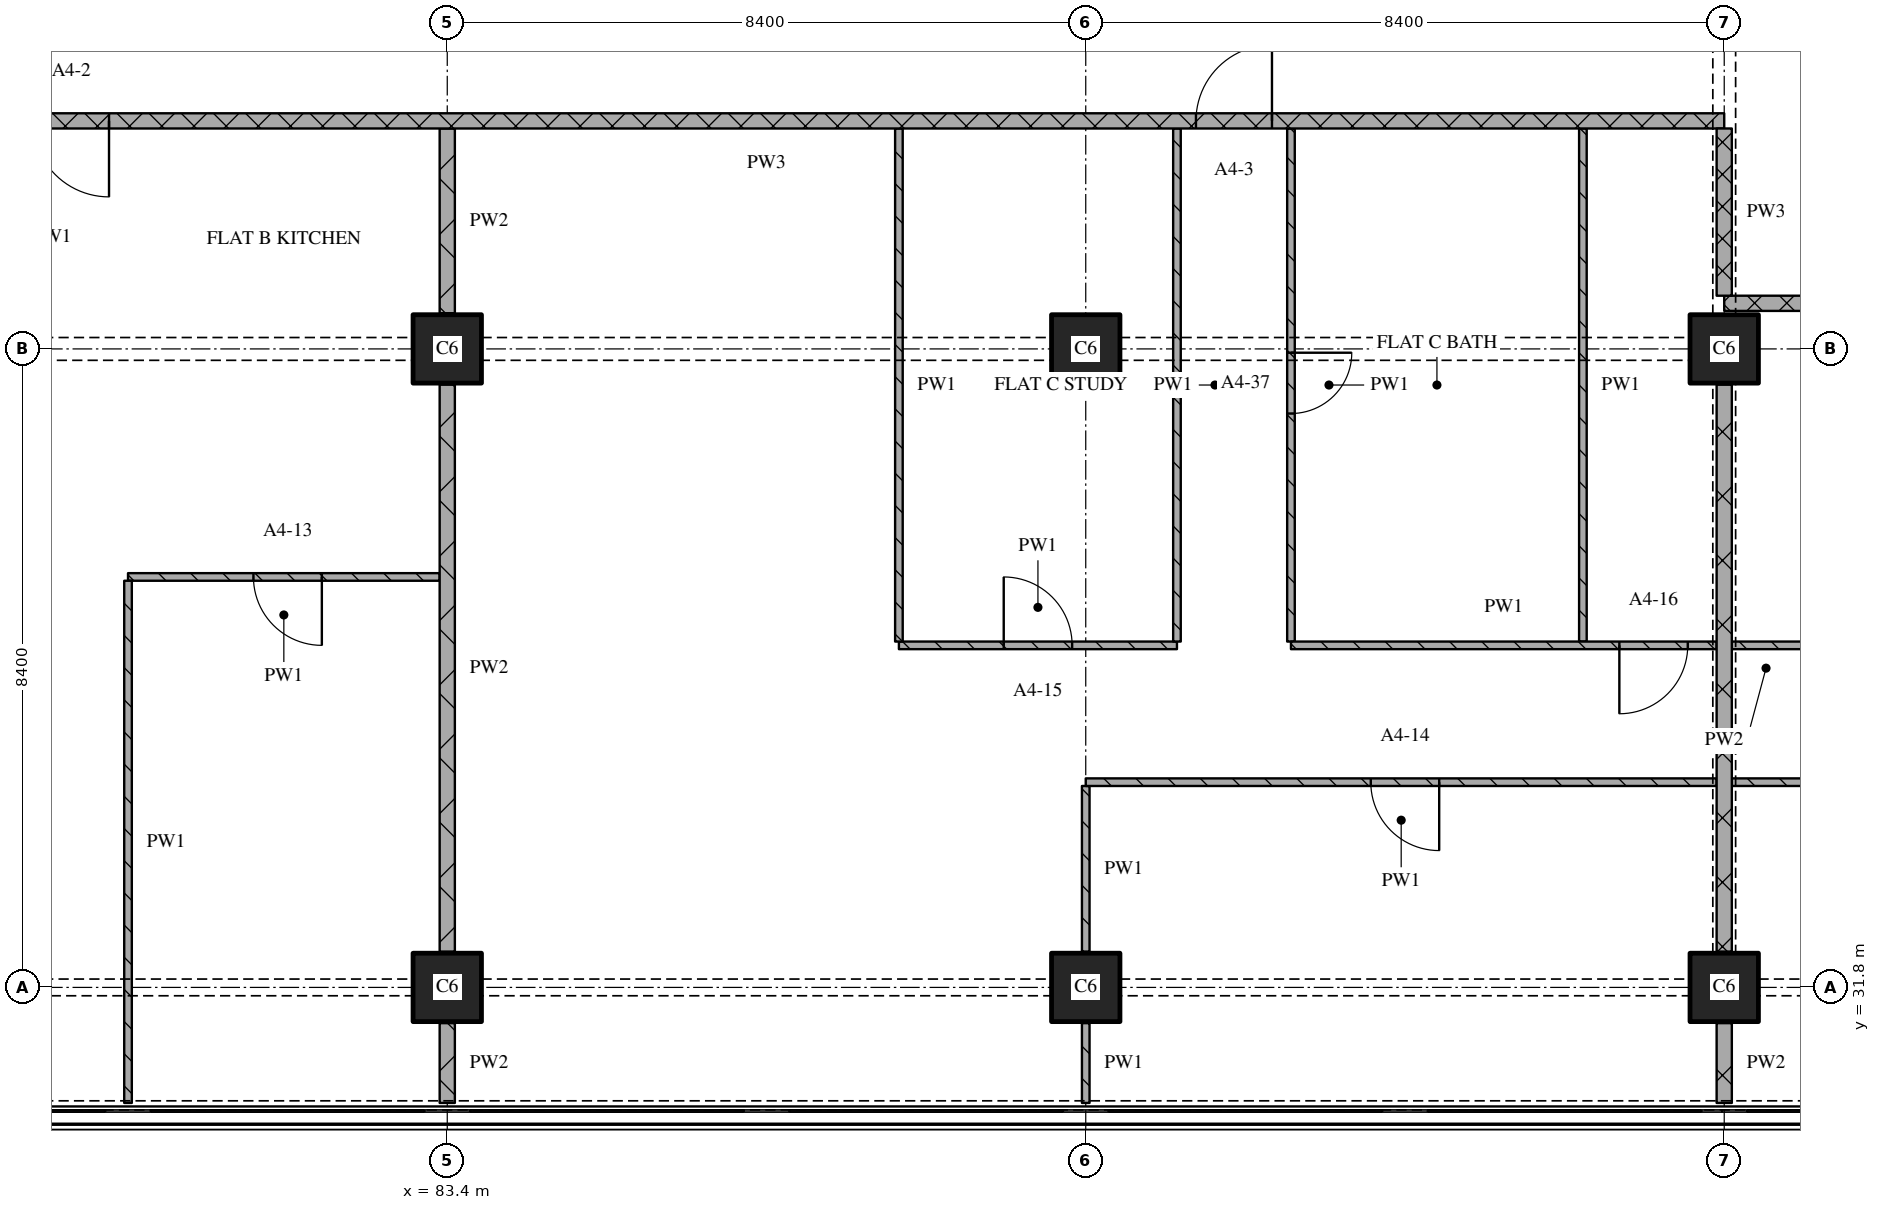
"""IFC4 building model, lengths in metres.
Left out: names, types, materials, properties, quantities, classifications, styles, units other than length and angle.
Written with IfcOpenShell. Run it as: python <this file> out.ifc"""

import sys

from ifc_helpers import new_model, si_unit, direction, frame, frame_2d, origin, origin_2d, place, context, subcontext, project, spatial, rectangle, extrude, element, fill, save


model = new_model("IFC4")
c1 = context("Model", 3, precision=1e-05, world=origin(), true_north=direction((0.0, 1.0)))
c2 = subcontext(c1, "Body", "Model", "MODEL_VIEW")
j1 = project(units=[si_unit("LENGTHUNIT", "METRE"), si_unit("PLANEANGLEUNIT", "RADIAN")], contexts=[c1])
p1 = place(None, origin())
s1 = spatial("IfcSite", under=j1, at=p1, CompositionType="ELEMENT")
p2 = place(p1, origin())
s2 = spatial("IfcBuilding", under=s1, at=p2, CompositionType="ELEMENT")
p3 = place(p2, frame((0.0, 0.0, 76.8)))
s3 = spatial("IfcBuildingStorey", under=s2, at=p3, CompositionType="ELEMENT", Elevation=76.8)
for number, where, z_axis, x_axis in (
    (1, (83.4, 31.8, 0.0), (0.0, 0.0, 1.0), (1.0, 0.0, 0.0)),
    (2, (83.4, 40.2, 0.0), (0.0, 0.0, 1.0), (1.0, 0.0, 0.0)),
    (3, (91.8, 31.8, 0.0), (0.0, 0.0, 1.0), (1.0, 0.0, 0.0)),
    (4, (91.8, 40.2, 0.0), (0.0, 0.0, 1.0), (1.0, 0.0, 0.0)),
    (5, (100.2, 31.8, 0.0), (0.0, 0.0, 1.0), (1.0, 0.0, 0.0)),
    (6, (100.2, 40.2, 0.0), (0.0, 0.0, 1.0), (1.0, 0.0, 0.0)),
):
    element("IfcColumn", number, at=place(p3, frame(where, z_axis=z_axis, x_axis=x_axis)), inside=s3, PredefinedType="COLUMN", context=c2, shape_type="SweptSolid", body=[
        extrude(rectangle(XDim=0.9, YDim=0.9, at=origin_2d()), origin(), (0.0, 0.0, 1.0), 3.6),
    ])
p4 = place(p3, frame((89.342, 36.3, 0.0), z_axis=(0.0, 0.0, 1.0), x_axis=(1.0, 0.0, 0.0)))
e7 = element("IfcWall", 7, at=p4, inside=s3, PredefinedType="PARTITIONING", context=c2, shape_type="SweptSolid", body=[
    extrude(rectangle(XDim=3.658, YDim=0.1, at=frame_2d((1.829, 0.0))), origin(), (0.0, 0.0, 1.0), 3.32),
])
p5 = place(p4, frame((1.379, 0.0, 0.0)))
e8 = element("IfcOpeningElement", 8, at=p5, cuts=e7, PredefinedType="OPENING", context=c2, shape_type="SweptSolid", body=[
    extrude(rectangle(XDim=0.9, YDim=2.1, at=frame_2d((0.45, 1.05))), frame((0.0, 0.06, 0.0), z_axis=(0.0, -1.0, 0.0), x_axis=(1.0, 0.0, 0.0)), (0.0, 0.0, 1.0), 0.12),
])
p6 = place(p3, frame((83.3, 37.2, 0.0), z_axis=(0.0, 0.0, 1.0), x_axis=(-1.0, 0.0, 0.0)))
e9 = element("IfcWall", 9, at=p6, inside=s3, PredefinedType="PARTITIONING", context=c2, shape_type="SweptSolid", body=[
    extrude(rectangle(XDim=4.1, YDim=0.1, at=frame_2d((2.05, 0.0))), origin(), (0.0, 0.0, 1.0), 3.32),
])
p7 = place(p6, frame((1.55, 0.0, 0.0)))
e10 = element("IfcOpeningElement", 10, at=p7, cuts=e9, PredefinedType="OPENING", context=c2, shape_type="SweptSolid", body=[
    extrude(rectangle(XDim=0.9, YDim=2.1, at=frame_2d((0.45, 1.05))), frame((0.0, 0.06, 0.0), z_axis=(0.0, -1.0, 0.0), x_axis=(1.0, 0.0, 0.0)), (0.0, 0.0, 1.0), 0.12),
])
p8 = place(p3, frame((124.28, 40.8, 0.0), z_axis=(0.0, 0.0, 1.0), x_axis=(-1.0, 0.0, 0.0)))
e11 = element("IfcWall", 11, at=p8, inside=s3, PredefinedType="PARTITIONING", context=c2, shape_type="SweptSolid", body=[
    extrude(rectangle(XDim=24.08, YDim=0.2, at=frame_2d((12.04, 0.0))), origin(), (0.0, 0.0, 1.0), 3.32),
])
p9 = place(p8, frame((12.03, 0.0, 0.0)))
e12 = element("IfcOpeningElement", 12, at=p9, cuts=e11, PredefinedType="OPENING", context=c2, shape_type="SweptSolid", body=[
    extrude(rectangle(XDim=1.0, YDim=2.1, at=frame_2d((0.5, 1.05))), frame((0.0, 0.11, 0.0), z_axis=(0.0, -1.0, 0.0), x_axis=(1.0, 0.0, 0.0)), (0.0, 0.0, 1.0), 0.22),
])
p10 = place(p3, frame((100.2, 43.2, 0.0), z_axis=(0.0, 0.0, 1.0), x_axis=(-1.0, 0.0, 0.0)))
e13 = element("IfcWall", 13, at=p10, inside=s3, PredefinedType="PARTITIONING", context=c2, shape_type="SweptSolid", body=[
    extrude(rectangle(XDim=25.2, YDim=0.2, at=frame_2d((12.6, 0.0))), origin(), (0.0, 0.0, 1.0), 3.32),
])
p11 = place(p10, frame((5.95, 0.0, 0.0)))
e14 = element("IfcOpeningElement", 14, at=p11, cuts=e13, PredefinedType="OPENING", context=c2, shape_type="SweptSolid", body=[
    extrude(rectangle(XDim=1.0, YDim=2.1, at=frame_2d((0.5, 1.05))), frame((0.0, 0.11, 0.0), z_axis=(0.0, -1.0, 0.0), x_axis=(1.0, 0.0, 0.0)), (0.0, 0.0, 1.0), 0.22),
])
p12 = place(p10, frame((21.25, 0.0, 0.0)))
e15 = element("IfcOpeningElement", 15, at=p12, cuts=e13, PredefinedType="OPENING", context=c2, shape_type="SweptSolid", body=[
    extrude(rectangle(XDim=1.0, YDim=2.1, at=frame_2d((0.5, 1.05))), frame((0.0, 0.11, 0.0), z_axis=(0.0, -1.0, 0.0), x_axis=(1.0, 0.0, 0.0)), (0.0, 0.0, 1.0), 0.22),
])
p13 = place(p3, frame((79.2, 37.15, 0.0), z_axis=(0.0, 0.0, 1.0), x_axis=(0.0, -1.0, 0.0)))
e16 = element("IfcWall", 16, at=p13, inside=s3, PredefinedType="PARTITIONING", context=c2, shape_type="SweptSolid", body=[
    extrude(rectangle(XDim=6.87, YDim=0.1, at=frame_2d((3.435, 0.0))), origin(), (0.0, 0.0, 1.0), 3.32),
])
p14 = place(p3, frame((83.4, 31.33, 0.0), z_axis=(0.0, 0.0, 1.0), x_axis=(0.0, -1.0, 0.0)))
e17 = element("IfcWall", 17, at=p14, inside=s3, PredefinedType="PARTITIONING", context=c2, shape_type="SweptSolid", body=[
    extrude(rectangle(XDim=1.05, YDim=0.2, at=frame_2d((0.525, 0.0))), origin(), (0.0, 0.0, 1.0), 3.32),
])
p15 = place(p3, frame((83.4, 39.73, 0.0), z_axis=(0.0, 0.0, 1.0), x_axis=(0.0, -1.0, 0.0)))
e18 = element("IfcWall", 18, at=p15, inside=s3, PredefinedType="PARTITIONING", context=c2, shape_type="SweptSolid", body=[
    extrude(rectangle(XDim=7.46, YDim=0.2, at=frame_2d((3.73, 0.0))), origin(), (0.0, 0.0, 1.0), 3.32),
])
p16 = place(p3, frame((83.4, 43.1, 0.0), z_axis=(0.0, 0.0, 1.0), x_axis=(0.0, -1.0, 0.0)))
e19 = element("IfcWall", 19, at=p16, inside=s3, PredefinedType="PARTITIONING", context=c2, shape_type="SweptSolid", body=[
    extrude(rectangle(XDim=2.43, YDim=0.2, at=frame_2d((1.215, 0.0))), origin(), (0.0, 0.0, 1.0), 3.32),
])
p17 = place(p3, frame((89.342, 43.1, 0.0), z_axis=(0.0, 0.0, 1.0), x_axis=(0.0, -1.0, 0.0)))
e20 = element("IfcWall", 20, at=p17, inside=s3, PredefinedType="PARTITIONING", context=c2, shape_type="SweptSolid", body=[
    extrude(rectangle(XDim=6.75, YDim=0.1, at=frame_2d((3.375, 0.0))), origin(), (0.0, 0.0, 1.0), 3.32),
])
p18 = place(p3, frame((91.8, 31.33, 0.0), z_axis=(0.0, 0.0, 1.0), x_axis=(0.0, -1.0, 0.0)))
e21 = element("IfcWall", 21, at=p18, inside=s3, PredefinedType="PARTITIONING", context=c2, shape_type="SweptSolid", body=[
    extrude(rectangle(XDim=1.05, YDim=0.1, at=frame_2d((0.525, 0.0))), origin(), (0.0, 0.0, 1.0), 3.32),
])
p19 = place(p3, frame((91.8, 34.45, 0.0), z_axis=(0.0, 0.0, 1.0), x_axis=(0.0, -1.0, 0.0)))
e22 = element("IfcWall", 22, at=p19, inside=s3, PredefinedType="PARTITIONING", context=c2, shape_type="SweptSolid", body=[
    extrude(rectangle(XDim=2.18, YDim=0.1, at=frame_2d((1.09, 0.0))), origin(), (0.0, 0.0, 1.0), 3.32),
])
p20 = place(p3, frame((93.0, 43.1, 0.0), z_axis=(0.0, 0.0, 1.0), x_axis=(0.0, -1.0, 0.0)))
e23 = element("IfcWall", 23, at=p20, inside=s3, PredefinedType="PARTITIONING", context=c2, shape_type="SweptSolid", body=[
    extrude(rectangle(XDim=6.75, YDim=0.1, at=frame_2d((3.375, 0.0))), origin(), (0.0, 0.0, 1.0), 3.32),
])
p21 = place(p3, frame((94.5, 43.1, 0.0), z_axis=(0.0, 0.0, 1.0), x_axis=(0.0, -1.0, 0.0)))
e24 = element("IfcWall", 24, at=p21, inside=s3, PredefinedType="PARTITIONING", context=c2, shape_type="SweptSolid", body=[
    extrude(rectangle(XDim=6.75, YDim=0.1, at=frame_2d((3.375, 0.0))), origin(), (0.0, 0.0, 1.0), 3.32),
])
p22 = place(p21, frame((2.95, 0.0, 0.0)))
e25 = element("IfcOpeningElement", 25, at=p22, cuts=e24, PredefinedType="OPENING", context=c2, shape_type="SweptSolid", body=[
    extrude(rectangle(XDim=0.8, YDim=2.1, at=frame_2d((0.4, 1.05))), frame((0.0, 0.06, 0.0), z_axis=(0.0, -1.0, 0.0), x_axis=(1.0, 0.0, 0.0)), (0.0, 0.0, 1.0), 0.12),
])
p23 = place(p3, frame((98.341, 43.1, 0.0), z_axis=(0.0, 0.0, 1.0), x_axis=(0.0, -1.0, 0.0)))
e26 = element("IfcWall", 26, at=p23, inside=s3, PredefinedType="PARTITIONING", context=c2, shape_type="SweptSolid", body=[
    extrude(rectangle(XDim=6.75, YDim=0.1, at=frame_2d((3.375, 0.0))), origin(), (0.0, 0.0, 1.0), 3.32),
])
p24 = place(p3, frame((100.2, 43.1, 0.0), z_axis=(0.0, 0.0, 1.0), x_axis=(0.0, -1.0, 0.0)))
e27 = element("IfcWall", 27, at=p24, inside=s3, PredefinedType="PARTITIONING", context=c2, shape_type="SweptSolid", body=[
    extrude(rectangle(XDim=2.2, YDim=0.2, at=frame_2d((1.1, 0.0))), origin(), (0.0, 0.0, 1.0), 2.43),
])
p25 = place(p3, frame((100.2, 31.33, 0.0), z_axis=(0.0, 0.0, 1.0), x_axis=(0.0, -1.0, 0.0)))
e28 = element("IfcWall", 28, at=p25, inside=s3, PredefinedType="PARTITIONING", context=c2, shape_type="SweptSolid", body=[
    extrude(rectangle(XDim=1.05, YDim=0.2, at=frame_2d((0.525, 0.0))), origin(), (0.0, 0.0, 1.0), 3.32),
])
p26 = place(p3, frame((100.2, 39.73, 0.0), z_axis=(0.0, 0.0, 1.0), x_axis=(0.0, -1.0, 0.0)))
e29 = element("IfcWall", 29, at=p26, inside=s3, PredefinedType="PARTITIONING", context=c2, shape_type="SweptSolid", body=[
    extrude(rectangle(XDim=7.46, YDim=0.2, at=frame_2d((3.73, 0.0))), origin(), (0.0, 0.0, 1.0), 2.83),
])
p27 = place(p3, frame((100.1, 34.5, 0.0), z_axis=(0.0, 0.0, 1.0), x_axis=(-1.0, 0.0, 0.0)))
e30 = element("IfcWall", 30, at=p27, inside=s3, PredefinedType="PARTITIONING", context=c2, shape_type="SweptSolid", body=[
    extrude(rectangle(XDim=8.3, YDim=0.1, at=frame_2d((4.15, 0.0))), origin(), (0.0, 0.0, 1.0), 3.32),
])
p28 = place(p27, frame((3.65, 0.0, 0.0)))
e31 = element("IfcOpeningElement", 31, at=p28, cuts=e30, PredefinedType="OPENING", context=c2, shape_type="SweptSolid", body=[
    extrude(rectangle(XDim=0.9, YDim=2.1, at=frame_2d((0.45, 1.05))), frame((0.0, 0.06, 0.0), z_axis=(0.0, -1.0, 0.0), x_axis=(1.0, 0.0, 0.0)), (0.0, 0.0, 1.0), 0.12),
])
p29 = place(p3, frame((117.0, 34.5, 0.0), z_axis=(0.0, 0.0, 1.0), x_axis=(-1.0, 0.0, 0.0)))
e32 = element("IfcWall", 32, at=p29, inside=s3, PredefinedType="PARTITIONING", context=c2, shape_type="SweptSolid", body=[
    extrude(rectangle(XDim=16.7, YDim=0.1, at=frame_2d((8.35, 0.0))), origin(), (0.0, 0.0, 1.0), 3.32),
])
p30 = place(p29, frame((7.95, 0.0, 0.0)))
e33 = element("IfcOpeningElement", 33, at=p30, cuts=e32, PredefinedType="OPENING", context=c2, shape_type="SweptSolid", body=[
    extrude(rectangle(XDim=0.9, YDim=2.1, at=frame_2d((0.45, 1.05))), frame((0.0, 0.06, 0.0), z_axis=(0.0, -1.0, 0.0), x_axis=(1.0, 0.0, 0.0)), (0.0, 0.0, 1.0), 0.12),
])
p31 = place(p29, frame((14.25, 0.0, 0.0)))
e34 = element("IfcOpeningElement", 34, at=p31, cuts=e32, PredefinedType="OPENING", context=c2, shape_type="SweptSolid", body=[
    extrude(rectangle(XDim=0.9, YDim=2.1, at=frame_2d((0.45, 1.05))), frame((0.0, 0.06, 0.0), z_axis=(0.0, -1.0, 0.0), x_axis=(1.0, 0.0, 0.0)), (0.0, 0.0, 1.0), 0.12),
])
p32 = place(p3, frame((94.5, 36.3, 0.0), z_axis=(0.0, 0.0, 1.0), x_axis=(1.0, 0.0, 0.0)))
e35 = element("IfcWall", 35, at=p32, inside=s3, PredefinedType="PARTITIONING", context=c2, shape_type="SweptSolid", body=[
    extrude(rectangle(XDim=5.6, YDim=0.1, at=frame_2d((2.8, 0.0))), origin(), (0.0, 0.0, 1.0), 3.32),
])
p33 = place(p32, frame((4.32, 0.0, 0.0)))
e36 = element("IfcOpeningElement", 36, at=p33, cuts=e35, PredefinedType="OPENING", context=c2, shape_type="SweptSolid", body=[
    extrude(rectangle(XDim=0.9, YDim=2.1, at=frame_2d((0.45, 1.05))), frame((0.0, 0.06, 0.0), z_axis=(0.0, -1.0, 0.0), x_axis=(1.0, 0.0, 0.0)), (0.0, 0.0, 1.0), 0.12),
])
p34 = place(p3, frame((100.3, 36.3, 0.0), z_axis=(0.0, 0.0, 1.0), x_axis=(1.0, 0.0, 0.0)))
e37 = element("IfcWall", 37, at=p34, inside=s3, PredefinedType="PARTITIONING", context=c2, shape_type="SweptSolid", body=[
    extrude(rectangle(XDim=10.7, YDim=0.1, at=frame_2d((5.35, 0.0))), origin(), (0.0, 0.0, 1.0), 3.32),
])
p35 = place(p34, frame((1.75, 0.0, 0.0)))
e38 = element("IfcOpeningElement", 38, at=p35, cuts=e37, PredefinedType="OPENING", context=c2, shape_type="SweptSolid", body=[
    extrude(rectangle(XDim=0.8, YDim=2.1, at=frame_2d((0.4, 1.05))), frame((0.0, 0.06, 0.0), z_axis=(0.0, -1.0, 0.0), x_axis=(1.0, 0.0, 0.0)), (0.0, 0.0, 1.0), 0.12),
])
p36 = place(p34, frame((6.25, 0.0, 0.0)))
e39 = element("IfcOpeningElement", 39, at=p36, cuts=e37, PredefinedType="OPENING", context=c2, shape_type="SweptSolid", body=[
    extrude(rectangle(XDim=0.8, YDim=2.1, at=frame_2d((0.4, 1.05))), frame((0.0, 0.06, 0.0), z_axis=(0.0, -1.0, 0.0), x_axis=(1.0, 0.0, 0.0)), (0.0, 0.0, 1.0), 0.12),
])
p37 = place(p5, origin())
e40 = element("IfcDoor", 40, at=p37, inside=s3, OperationType="SINGLE_SWING_LEFT", PredefinedType="DOOR", context=c2, shape_type="SweptSolid", body=[
    extrude(rectangle(XDim=0.9, YDim=2.1, at=frame_2d((0.45, 1.05))), frame((0.0, 0.025, 0.0), z_axis=(0.0, -1.0, 0.0), x_axis=(1.0, 0.0, 0.0)), (0.0, 0.0, 1.0), 0.05),
])
fill(e8, e40)
p38 = place(p7, origin())
e41 = element("IfcDoor", 41, at=p38, inside=s3, OperationType="SINGLE_SWING_LEFT", PredefinedType="DOOR", context=c2, shape_type="SweptSolid", body=[
    extrude(rectangle(XDim=0.9, YDim=2.1, at=frame_2d((0.45, 1.05))), frame((0.0, 0.025, 0.0), z_axis=(0.0, -1.0, 0.0), x_axis=(1.0, 0.0, 0.0)), (0.0, 0.0, 1.0), 0.05),
])
fill(e10, e41)
p39 = place(p11, origin())
e42 = element("IfcDoor", 42, at=p39, inside=s3, OperationType="SINGLE_SWING_RIGHT", PredefinedType="DOOR", context=c2, shape_type="SweptSolid", body=[
    extrude(rectangle(XDim=1.0, YDim=2.1, at=frame_2d((0.5, 1.05))), frame((0.0, 0.025, 0.0), z_axis=(0.0, -1.0, 0.0), x_axis=(1.0, 0.0, 0.0)), (0.0, 0.0, 1.0), 0.05),
])
fill(e14, e42)
p40 = place(p12, origin())
e43 = element("IfcDoor", 43, at=p40, inside=s3, OperationType="SINGLE_SWING_LEFT", PredefinedType="DOOR", context=c2, shape_type="SweptSolid", body=[
    extrude(rectangle(XDim=1.0, YDim=2.1, at=frame_2d((0.5, 1.05))), frame((0.0, 0.025, 0.0), z_axis=(0.0, -1.0, 0.0), x_axis=(1.0, 0.0, 0.0)), (0.0, 0.0, 1.0), 0.05),
])
fill(e15, e43)
p41 = place(p22, origin())
e44 = element("IfcDoor", 44, at=p41, inside=s3, OperationType="SINGLE_SWING_LEFT", PredefinedType="DOOR", context=c2, shape_type="SweptSolid", body=[
    extrude(rectangle(XDim=0.8, YDim=2.1, at=frame_2d((0.4, 1.05))), frame((0.0, 0.025, 0.0), z_axis=(0.0, -1.0, 0.0), x_axis=(1.0, 0.0, 0.0)), (0.0, 0.0, 1.0), 0.05),
])
fill(e25, e44)
p42 = place(p28, origin())
e45 = element("IfcDoor", 45, at=p42, inside=s3, OperationType="SINGLE_SWING_LEFT", PredefinedType="DOOR", context=c2, shape_type="SweptSolid", body=[
    extrude(rectangle(XDim=0.9, YDim=2.1, at=frame_2d((0.45, 1.05))), frame((0.0, 0.025, 0.0), z_axis=(0.0, -1.0, 0.0), x_axis=(1.0, 0.0, 0.0)), (0.0, 0.0, 1.0), 0.05),
])
fill(e31, e45)
p43 = place(p33, origin())
e46 = element("IfcDoor", 46, at=p43, inside=s3, OperationType="SINGLE_SWING_RIGHT", PredefinedType="DOOR", context=c2, shape_type="SweptSolid", body=[
    extrude(rectangle(XDim=0.9, YDim=2.1, at=frame_2d((0.45, 1.05))), frame((0.0, 0.025, 0.0), z_axis=(0.0, -1.0, 0.0), x_axis=(1.0, 0.0, 0.0)), (0.0, 0.0, 1.0), 0.05),
])
fill(e36, e46)
save(model, sys.argv[1])
